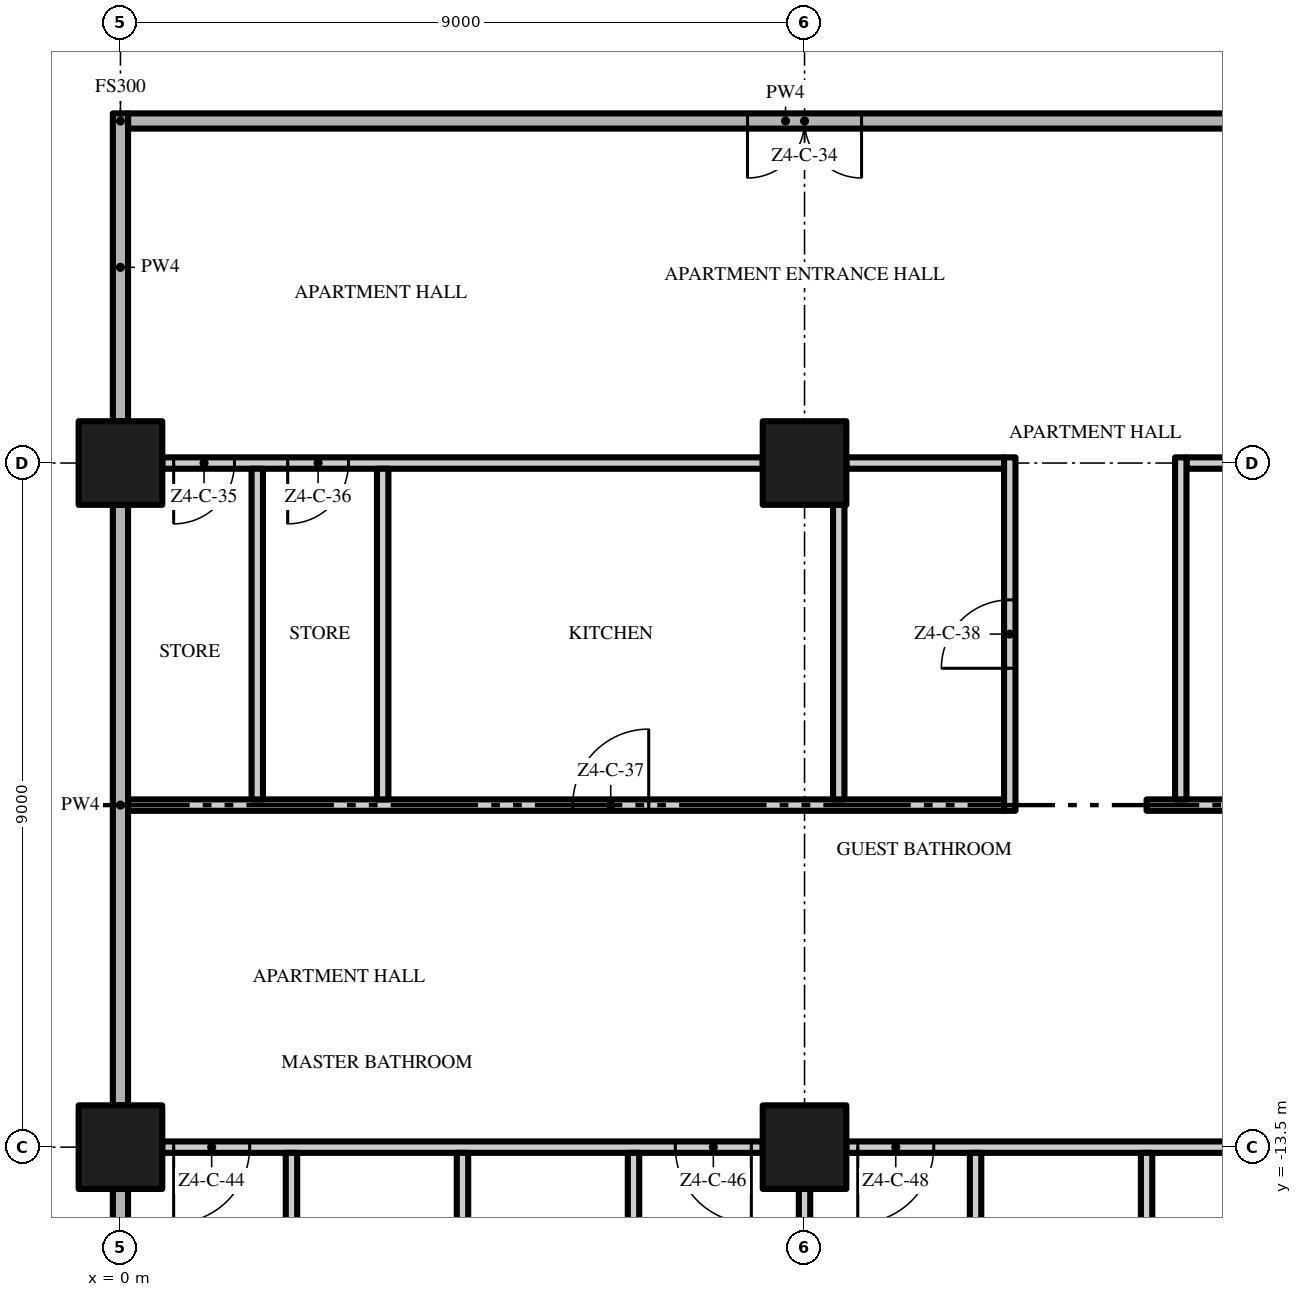
"""IFC4 building model, lengths in metres.
Left out: names, types, materials, properties, quantities, classifications, styles, units other than length and angle.
Written with IfcOpenShell. Run it as: python <this file> out.ifc"""

import sys

from ifc_helpers import new_model, si_unit, direction, frame, frame_2d, origin, origin_2d, place, context, subcontext, project, spatial, rectangle, extrude, element, fill, save


model = new_model("IFC4")
c1 = context("Model", 3, precision=1e-05, world=origin(), true_north=direction((0.0, 1.0)))
c2 = subcontext(c1, "Body", "Model", "MODEL_VIEW")
j1 = project(units=[si_unit("LENGTHUNIT", "METRE"), si_unit("PLANEANGLEUNIT", "RADIAN")], contexts=[c1])
p1 = place(None, origin())
s1 = spatial("IfcSite", under=j1, at=p1, CompositionType="ELEMENT")
p2 = place(p1, origin())
s2 = spatial("IfcBuilding", under=s1, at=p2, CompositionType="ELEMENT")
p3 = place(p2, frame((0.0, 0.0, 214.8)))
s3 = spatial("IfcBuildingStorey", under=s2, at=p3, CompositionType="ELEMENT", Elevation=214.8)
for number, where, z_axis, x_axis in (
    (1, (0.0, -13.5, 0.0), (0.0, 0.0, 1.0), (1.0, 0.0, 0.0)),
    (2, (0.0, -4.5, 0.0), (0.0, 0.0, 1.0), (1.0, 0.0, 0.0)),
    (3, (9.0, -13.5, 0.0), (0.0, 0.0, 1.0), (1.0, 0.0, 0.0)),
    (4, (9.0, -4.5, 0.0), (0.0, 0.0, 1.0), (1.0, 0.0, 0.0)),
):
    element("IfcColumn", number, at=place(p3, frame(where, z_axis=z_axis, x_axis=x_axis)), inside=s3, PredefinedType="COLUMN", context=c2, shape_type="SweptSolid", body=[
        extrude(rectangle(XDim=1.1, YDim=1.1, at=origin_2d()), origin(), (0.0, 0.0, 1.0), 3.5),
    ])
p4 = place(p3, frame((8.45, -13.5, 0.0), z_axis=(0.0, 0.0, 1.0), x_axis=(-1.0, 0.0, 0.0)))
e5 = element("IfcWall", 5, at=p4, inside=s3, PredefinedType="PARTITIONING", context=c2, shape_type="SweptSolid", body=[
    extrude(rectangle(XDim=7.9, YDim=0.15, at=frame_2d((3.95, 0.0))), origin(), (0.0, 0.0, 1.0), 3.5),
])
p5 = place(p4, frame((6.75, 0.0, 0.0)))
e6 = element("IfcOpeningElement", 6, at=p5, cuts=e5, PredefinedType="OPENING", context=c2, shape_type="SweptSolid", body=[
    extrude(rectangle(XDim=1.0, YDim=2.4, at=frame_2d((0.5, 1.2))), frame((0.0, 0.085, 0.0), z_axis=(0.0, -1.0, 0.0), x_axis=(1.0, 0.0, 0.0)), (0.0, 0.0, 1.0), 0.17),
])
p6 = place(p4, frame((0.15, 0.0, 0.0)))
e7 = element("IfcOpeningElement", 7, at=p6, cuts=e5, PredefinedType="OPENING", context=c2, shape_type="SweptSolid", body=[
    extrude(rectangle(XDim=1.0, YDim=2.4, at=frame_2d((0.5, 1.2))), frame((0.0, 0.085, 0.0), z_axis=(0.0, -1.0, 0.0), x_axis=(1.0, 0.0, 0.0)), (0.0, 0.0, 1.0), 0.17),
])
p7 = place(p3, frame((17.45, -13.5, 0.0), z_axis=(0.0, 0.0, 1.0), x_axis=(-1.0, 0.0, 0.0)))
e8 = element("IfcWall", 8, at=p7, inside=s3, PredefinedType="PARTITIONING", context=c2, shape_type="SweptSolid", body=[
    extrude(rectangle(XDim=7.9, YDim=0.15, at=frame_2d((3.95, 0.0))), origin(), (0.0, 0.0, 1.0), 3.5),
])
p8 = place(p7, frame((6.75, 0.0, 0.0)))
e9 = element("IfcOpeningElement", 9, at=p8, cuts=e8, PredefinedType="OPENING", context=c2, shape_type="SweptSolid", body=[
    extrude(rectangle(XDim=1.0, YDim=2.4, at=frame_2d((0.5, 1.2))), frame((0.0, 0.085, 0.0), z_axis=(0.0, -1.0, 0.0), x_axis=(1.0, 0.0, 0.0)), (0.0, 0.0, 1.0), 0.17),
])
p9 = place(p7, frame((0.15, 0.0, 0.0)))
e10 = element("IfcOpeningElement", 10, at=p9, cuts=e8, PredefinedType="OPENING", context=c2, shape_type="SweptSolid", body=[
    extrude(rectangle(XDim=1.0, YDim=2.4, at=frame_2d((0.5, 1.2))), frame((0.0, 0.085, 0.0), z_axis=(0.0, -1.0, 0.0), x_axis=(1.0, 0.0, 0.0)), (0.0, 0.0, 1.0), 0.17),
])
p10 = place(p3, frame((0.1, -9.0, 0.0), z_axis=(0.0, 0.0, 1.0), x_axis=(1.0, 0.0, 0.0)))
e11 = element("IfcWall", 11, at=p10, inside=s3, PredefinedType="PARTITIONING", context=c2, shape_type="SweptSolid", body=[
    extrude(rectangle(XDim=11.525, YDim=0.15, at=frame_2d((5.763, 0.0))), origin(), (0.0, 0.0, 1.0), 3.5),
])
p11 = place(p10, frame((5.85, 0.0, 0.0)))
e12 = element("IfcOpeningElement", 12, at=p11, cuts=e11, PredefinedType="OPENING", context=c2, shape_type="SweptSolid", body=[
    extrude(rectangle(XDim=1.0, YDim=2.4, at=frame_2d((0.5, 1.2))), frame((0.0, 0.085, 0.0), z_axis=(0.0, -1.0, 0.0), x_axis=(1.0, 0.0, 0.0)), (0.0, 0.0, 1.0), 0.17),
])
p12 = place(p3, frame((13.5, -9.0, 0.0), z_axis=(0.0, 0.0, 1.0), x_axis=(1.0, 0.0, 0.0)))
e13 = element("IfcWall", 13, at=p12, inside=s3, PredefinedType="PARTITIONING", context=c2, shape_type="SweptSolid", body=[
    extrude(rectangle(XDim=13.2, YDim=0.15, at=frame_2d((6.6, 0.0))), origin(), (0.0, 0.0, 1.0), 3.5),
])
p13 = place(p12, frame((4.1, 0.0, 0.0)))
e14 = element("IfcOpeningElement", 14, at=p13, cuts=e13, PredefinedType="OPENING", context=c2, shape_type="SweptSolid", body=[
    extrude(rectangle(XDim=0.8, YDim=2.0, at=frame_2d((0.4, 1.0))), frame((0.0, 0.085, 0.0), z_axis=(0.0, -1.0, 0.0), x_axis=(1.0, 0.0, 0.0)), (0.0, 0.0, 1.0), 0.17),
])
p14 = place(p3, frame((8.45, -4.5, 0.0), z_axis=(0.0, 0.0, 1.0), x_axis=(-1.0, 0.0, 0.0)))
e15 = element("IfcWall", 15, at=p14, inside=s3, PredefinedType="PARTITIONING", context=c2, shape_type="SweptSolid", body=[
    extrude(rectangle(XDim=7.9, YDim=0.15, at=frame_2d((3.95, 0.0))), origin(), (0.0, 0.0, 1.0), 3.5),
])
p15 = place(p14, frame((6.95, 0.0, 0.0)))
e16 = element("IfcOpeningElement", 16, at=p15, cuts=e15, PredefinedType="OPENING", context=c2, shape_type="SweptSolid", body=[
    extrude(rectangle(XDim=0.8, YDim=2.0, at=frame_2d((0.4, 1.0))), frame((0.0, 0.085, 0.0), z_axis=(0.0, -1.0, 0.0), x_axis=(1.0, 0.0, 0.0)), (0.0, 0.0, 1.0), 0.17),
])
p16 = place(p14, frame((5.45, 0.0, 0.0)))
e17 = element("IfcOpeningElement", 17, at=p16, cuts=e15, PredefinedType="OPENING", context=c2, shape_type="SweptSolid", body=[
    extrude(rectangle(XDim=0.8, YDim=2.0, at=frame_2d((0.4, 1.0))), frame((0.0, 0.085, 0.0), z_axis=(0.0, -1.0, 0.0), x_axis=(1.0, 0.0, 0.0)), (0.0, 0.0, 1.0), 0.17),
])
p17 = place(p3, frame((9.55, -4.5, 0.0), z_axis=(0.0, 0.0, 1.0), x_axis=(1.0, 0.0, 0.0)))
e18 = element("IfcWall", 18, at=p17, inside=s3, PredefinedType="PARTITIONING", context=c2, shape_type="SweptSolid", body=[
    extrude(rectangle(XDim=2.075, YDim=0.15, at=frame_2d((1.038, 0.0))), origin(), (0.0, 0.0, 1.0), 3.5),
])
p18 = place(p3, frame((17.45, -4.5, 0.0), z_axis=(0.0, 0.0, 1.0), x_axis=(-1.0, 0.0, 0.0)))
e19 = element("IfcWall", 19, at=p18, inside=s3, PredefinedType="PARTITIONING", context=c2, shape_type="SweptSolid", body=[
    extrude(rectangle(XDim=3.425, YDim=0.15, at=frame_2d((1.712, 0.0))), origin(), (0.0, 0.0, 1.0), 3.5),
])
p19 = place(p18, frame((1.825, 0.0, 0.0)))
e20 = element("IfcOpeningElement", 20, at=p19, cuts=e19, PredefinedType="OPENING", context=c2, shape_type="SweptSolid", body=[
    extrude(rectangle(XDim=0.8, YDim=2.0, at=frame_2d((0.4, 1.0))), frame((0.0, 0.085, 0.0), z_axis=(0.0, -1.0, 0.0), x_axis=(1.0, 0.0, 0.0)), (0.0, 0.0, 1.0), 0.17),
])
p20 = place(p3, frame((17.4, 0.0, 0.0), z_axis=(0.0, 0.0, 1.0), x_axis=(-1.0, 0.0, 0.0)))
e21 = element("IfcWall", 21, at=p20, inside=s3, PredefinedType="PARTITIONING", context=c2, shape_type="SweptSolid", body=[
    extrude(rectangle(XDim=17.3, YDim=0.2, at=frame_2d((8.65, 0.0))), origin(), (0.0, 0.0, 1.0), 3.5),
])
p21 = place(p20, frame((7.65, 0.0, 0.0)))
e22 = element("IfcOpeningElement", 22, at=p21, cuts=e21, PredefinedType="OPENING", context=c2, shape_type="SweptSolid", body=[
    extrude(rectangle(XDim=1.5, YDim=2.4, at=frame_2d((0.75, 1.2))), frame((0.0, 0.11, 0.0), z_axis=(0.0, -1.0, 0.0), x_axis=(1.0, 0.0, 0.0)), (0.0, 0.0, 1.0), 0.22),
])
p22 = place(p3, frame((0.0, -21.5, 0.0), z_axis=(0.0, 0.0, 1.0), x_axis=(0.0, 1.0, 0.0)))
e23 = element("IfcWall", 23, at=p22, inside=s3, PredefinedType="PARTITIONING", context=c2, shape_type="SweptSolid", body=[
    extrude(rectangle(XDim=7.45, YDim=0.2, at=frame_2d((3.725, 0.0))), origin(), (0.0, 0.0, 1.0), 3.5),
])
p23 = place(p3, frame((0.0, -12.95, 0.0), z_axis=(0.0, 0.0, 1.0), x_axis=(0.0, 1.0, 0.0)))
e24 = element("IfcWall", 24, at=p23, inside=s3, PredefinedType="PARTITIONING", context=c2, shape_type="SweptSolid", body=[
    extrude(rectangle(XDim=7.9, YDim=0.2, at=frame_2d((3.95, 0.0))), origin(), (0.0, 0.0, 1.0), 3.5),
])
p24 = place(p3, frame((0.0, -3.95, 0.0), z_axis=(0.0, 0.0, 1.0), x_axis=(0.0, 1.0, 0.0)))
e25 = element("IfcWall", 25, at=p24, inside=s3, PredefinedType="PARTITIONING", context=c2, shape_type="SweptSolid", body=[
    extrude(rectangle(XDim=4.05, YDim=0.2, at=frame_2d((2.025, 0.0))), origin(), (0.0, 0.0, 1.0), 3.5),
])
p25 = place(p3, frame((1.8, -8.925, 0.0), z_axis=(0.0, 0.0, 1.0), x_axis=(0.0, 1.0, 0.0)))
e26 = element("IfcWall", 26, at=p25, inside=s3, PredefinedType="PARTITIONING", context=c2, shape_type="SweptSolid", body=[
    extrude(rectangle(XDim=4.35, YDim=0.15, at=frame_2d((2.175, 0.0))), origin(), (0.0, 0.0, 1.0), 3.5),
])
p26 = place(p3, frame((2.25, -16.575, 0.0), z_axis=(0.0, 0.0, 1.0), x_axis=(0.0, 1.0, 0.0)))
e27 = element("IfcWall", 27, at=p26, inside=s3, PredefinedType="PARTITIONING", context=c2, shape_type="SweptSolid", body=[
    extrude(rectangle(XDim=3.0, YDim=0.15, at=frame_2d((1.5, 0.0))), origin(), (0.0, 0.0, 1.0), 3.5),
])
p27 = place(p3, frame((3.45, -8.925, 0.0), z_axis=(0.0, 0.0, 1.0), x_axis=(0.0, 1.0, 0.0)))
e28 = element("IfcWall", 28, at=p27, inside=s3, PredefinedType="PARTITIONING", context=c2, shape_type="SweptSolid", body=[
    extrude(rectangle(XDim=4.35, YDim=0.15, at=frame_2d((2.175, 0.0))), origin(), (0.0, 0.0, 1.0), 3.5),
])
p28 = place(p3, frame((4.5, -22.2, 0.0), z_axis=(0.0, 0.0, 1.0), x_axis=(0.0, 1.0, 0.0)))
e29 = element("IfcWall", 29, at=p28, inside=s3, PredefinedType="PARTITIONING", context=c2, shape_type="SweptSolid", body=[
    extrude(rectangle(XDim=8.625, YDim=0.15, at=frame_2d((4.312, 0.0))), origin(), (0.0, 0.0, 1.0), 3.5),
])
p29 = place(p3, frame((6.75, -16.575, 0.0), z_axis=(0.0, 0.0, 1.0), x_axis=(0.0, 1.0, 0.0)))
e30 = element("IfcWall", 30, at=p29, inside=s3, PredefinedType="PARTITIONING", context=c2, shape_type="SweptSolid", body=[
    extrude(rectangle(XDim=3.0, YDim=0.15, at=frame_2d((1.5, 0.0))), origin(), (0.0, 0.0, 1.0), 3.5),
])
p30 = place(p3, frame((9.0, -21.5, 0.0), z_axis=(0.0, 0.0, 1.0), x_axis=(0.0, 1.0, 0.0)))
e31 = element("IfcWall", 31, at=p30, inside=s3, PredefinedType="PARTITIONING", context=c2, shape_type="SweptSolid", body=[
    extrude(rectangle(XDim=7.45, YDim=0.15, at=frame_2d((3.725, 0.0))), origin(), (0.0, 0.0, 1.0), 3.5),
])
p31 = place(p3, frame((9.45, -8.925, 0.0), z_axis=(0.0, 0.0, 1.0), x_axis=(0.0, 1.0, 0.0)))
e32 = element("IfcWall", 32, at=p31, inside=s3, PredefinedType="PARTITIONING", context=c2, shape_type="SweptSolid", body=[
    extrude(rectangle(XDim=3.875, YDim=0.15, at=frame_2d((1.938, 0.0))), origin(), (0.0, 0.0, 1.0), 3.5),
])
p32 = place(p3, frame((11.25, -16.575, 0.0), z_axis=(0.0, 0.0, 1.0), x_axis=(0.0, 1.0, 0.0)))
e33 = element("IfcWall", 33, at=p32, inside=s3, PredefinedType="PARTITIONING", context=c2, shape_type="SweptSolid", body=[
    extrude(rectangle(XDim=3.0, YDim=0.15, at=frame_2d((1.5, 0.0))), origin(), (0.0, 0.0, 1.0), 3.5),
])
p33 = place(p3, frame((11.7, -9.075, 0.0), z_axis=(0.0, 0.0, 1.0), x_axis=(0.0, 1.0, 0.0)))
e34 = element("IfcWall", 34, at=p33, inside=s3, PredefinedType="PARTITIONING", context=c2, shape_type="SweptSolid", body=[
    extrude(rectangle(XDim=4.65, YDim=0.15, at=frame_2d((2.325, 0.0))), origin(), (0.0, 0.0, 1.0), 3.5),
])
p34 = place(p33, frame((1.875, 0.0, 0.0)))
e35 = element("IfcOpeningElement", 35, at=p34, cuts=e34, PredefinedType="OPENING", context=c2, shape_type="SweptSolid", body=[
    extrude(rectangle(XDim=0.9, YDim=2.1, at=frame_2d((0.45, 1.05))), frame((0.0, 0.085, 0.0), z_axis=(0.0, -1.0, 0.0), x_axis=(1.0, 0.0, 0.0)), (0.0, 0.0, 1.0), 0.17),
])
p35 = place(p3, frame((13.5, -22.2, 0.0), z_axis=(0.0, 0.0, 1.0), x_axis=(0.0, 1.0, 0.0)))
e36 = element("IfcWall", 36, at=p35, inside=s3, PredefinedType="PARTITIONING", context=c2, shape_type="SweptSolid", body=[
    extrude(rectangle(XDim=8.625, YDim=0.15, at=frame_2d((4.312, 0.0))), origin(), (0.0, 0.0, 1.0), 3.5),
])
p36 = place(p3, frame((13.95, -8.925, 0.0), z_axis=(0.0, 0.0, 1.0), x_axis=(0.0, 1.0, 0.0)))
e37 = element("IfcWall", 37, at=p36, inside=s3, PredefinedType="PARTITIONING", context=c2, shape_type="SweptSolid", body=[
    extrude(rectangle(XDim=4.5, YDim=0.15, at=frame_2d((2.25, 0.0))), origin(), (0.0, 0.0, 1.0), 3.5),
])
p37 = place(p21, origin())
e38 = element("IfcDoor", 38, at=p37, inside=s3, OperationType="DOUBLE_DOOR_SINGLE_SWING", PredefinedType="DOOR", context=c2, shape_type="SweptSolid", body=[
    extrude(rectangle(XDim=1.5, YDim=2.4, at=frame_2d((0.75, 1.2))), frame((0.0, 0.025, 0.0), z_axis=(0.0, -1.0, 0.0), x_axis=(1.0, 0.0, 0.0)), (0.0, 0.0, 1.0), 0.05),
])
fill(e22, e38)
p38 = place(p15, origin())
e39 = element("IfcDoor", 39, at=p38, inside=s3, OperationType="SINGLE_SWING_RIGHT", PredefinedType="DOOR", context=c2, shape_type="SweptSolid", body=[
    extrude(rectangle(XDim=0.8, YDim=2.0, at=frame_2d((0.4, 1.0))), frame((0.0, 0.025, 0.0), z_axis=(0.0, -1.0, 0.0), x_axis=(1.0, 0.0, 0.0)), (0.0, 0.0, 1.0), 0.05),
])
fill(e16, e39)
p39 = place(p16, origin())
e40 = element("IfcDoor", 40, at=p39, inside=s3, OperationType="SINGLE_SWING_RIGHT", PredefinedType="DOOR", context=c2, shape_type="SweptSolid", body=[
    extrude(rectangle(XDim=0.8, YDim=2.0, at=frame_2d((0.4, 1.0))), frame((0.0, 0.025, 0.0), z_axis=(0.0, -1.0, 0.0), x_axis=(1.0, 0.0, 0.0)), (0.0, 0.0, 1.0), 0.05),
])
fill(e17, e40)
p40 = place(p11, origin())
e41 = element("IfcDoor", 41, at=p40, inside=s3, OperationType="SINGLE_SWING_RIGHT", PredefinedType="DOOR", context=c2, shape_type="SweptSolid", body=[
    extrude(rectangle(XDim=1.0, YDim=2.4, at=frame_2d((0.5, 1.2))), frame((0.0, 0.025, 0.0), z_axis=(0.0, -1.0, 0.0), x_axis=(1.0, 0.0, 0.0)), (0.0, 0.0, 1.0), 0.05),
])
fill(e12, e41)
p41 = place(p34, origin())
e42 = element("IfcDoor", 42, at=p41, inside=s3, OperationType="SINGLE_SWING_LEFT", PredefinedType="DOOR", context=c2, shape_type="SweptSolid", body=[
    extrude(rectangle(XDim=0.9, YDim=2.1, at=frame_2d((0.45, 1.05))), frame((0.0, 0.025, 0.0), z_axis=(0.0, -1.0, 0.0), x_axis=(1.0, 0.0, 0.0)), (0.0, 0.0, 1.0), 0.05),
])
fill(e35, e42)
p42 = place(p5, origin())
e43 = element("IfcDoor", 43, at=p42, inside=s3, OperationType="SINGLE_SWING_RIGHT", PredefinedType="DOOR", context=c2, shape_type="SweptSolid", body=[
    extrude(rectangle(XDim=1.0, YDim=2.4, at=frame_2d((0.5, 1.2))), frame((0.0, 0.025, 0.0), z_axis=(0.0, -1.0, 0.0), x_axis=(1.0, 0.0, 0.0)), (0.0, 0.0, 1.0), 0.05),
])
fill(e6, e43)
p43 = place(p6, origin())
e44 = element("IfcDoor", 44, at=p43, inside=s3, OperationType="SINGLE_SWING_LEFT", PredefinedType="DOOR", context=c2, shape_type="SweptSolid", body=[
    extrude(rectangle(XDim=1.0, YDim=2.4, at=frame_2d((0.5, 1.2))), frame((0.0, 0.025, 0.0), z_axis=(0.0, -1.0, 0.0), x_axis=(1.0, 0.0, 0.0)), (0.0, 0.0, 1.0), 0.05),
])
fill(e7, e44)
p44 = place(p8, origin())
e45 = element("IfcDoor", 45, at=p44, inside=s3, OperationType="SINGLE_SWING_RIGHT", PredefinedType="DOOR", context=c2, shape_type="SweptSolid", body=[
    extrude(rectangle(XDim=1.0, YDim=2.4, at=frame_2d((0.5, 1.2))), frame((0.0, 0.025, 0.0), z_axis=(0.0, -1.0, 0.0), x_axis=(1.0, 0.0, 0.0)), (0.0, 0.0, 1.0), 0.05),
])
fill(e9, e45)
save(model, sys.argv[1])
